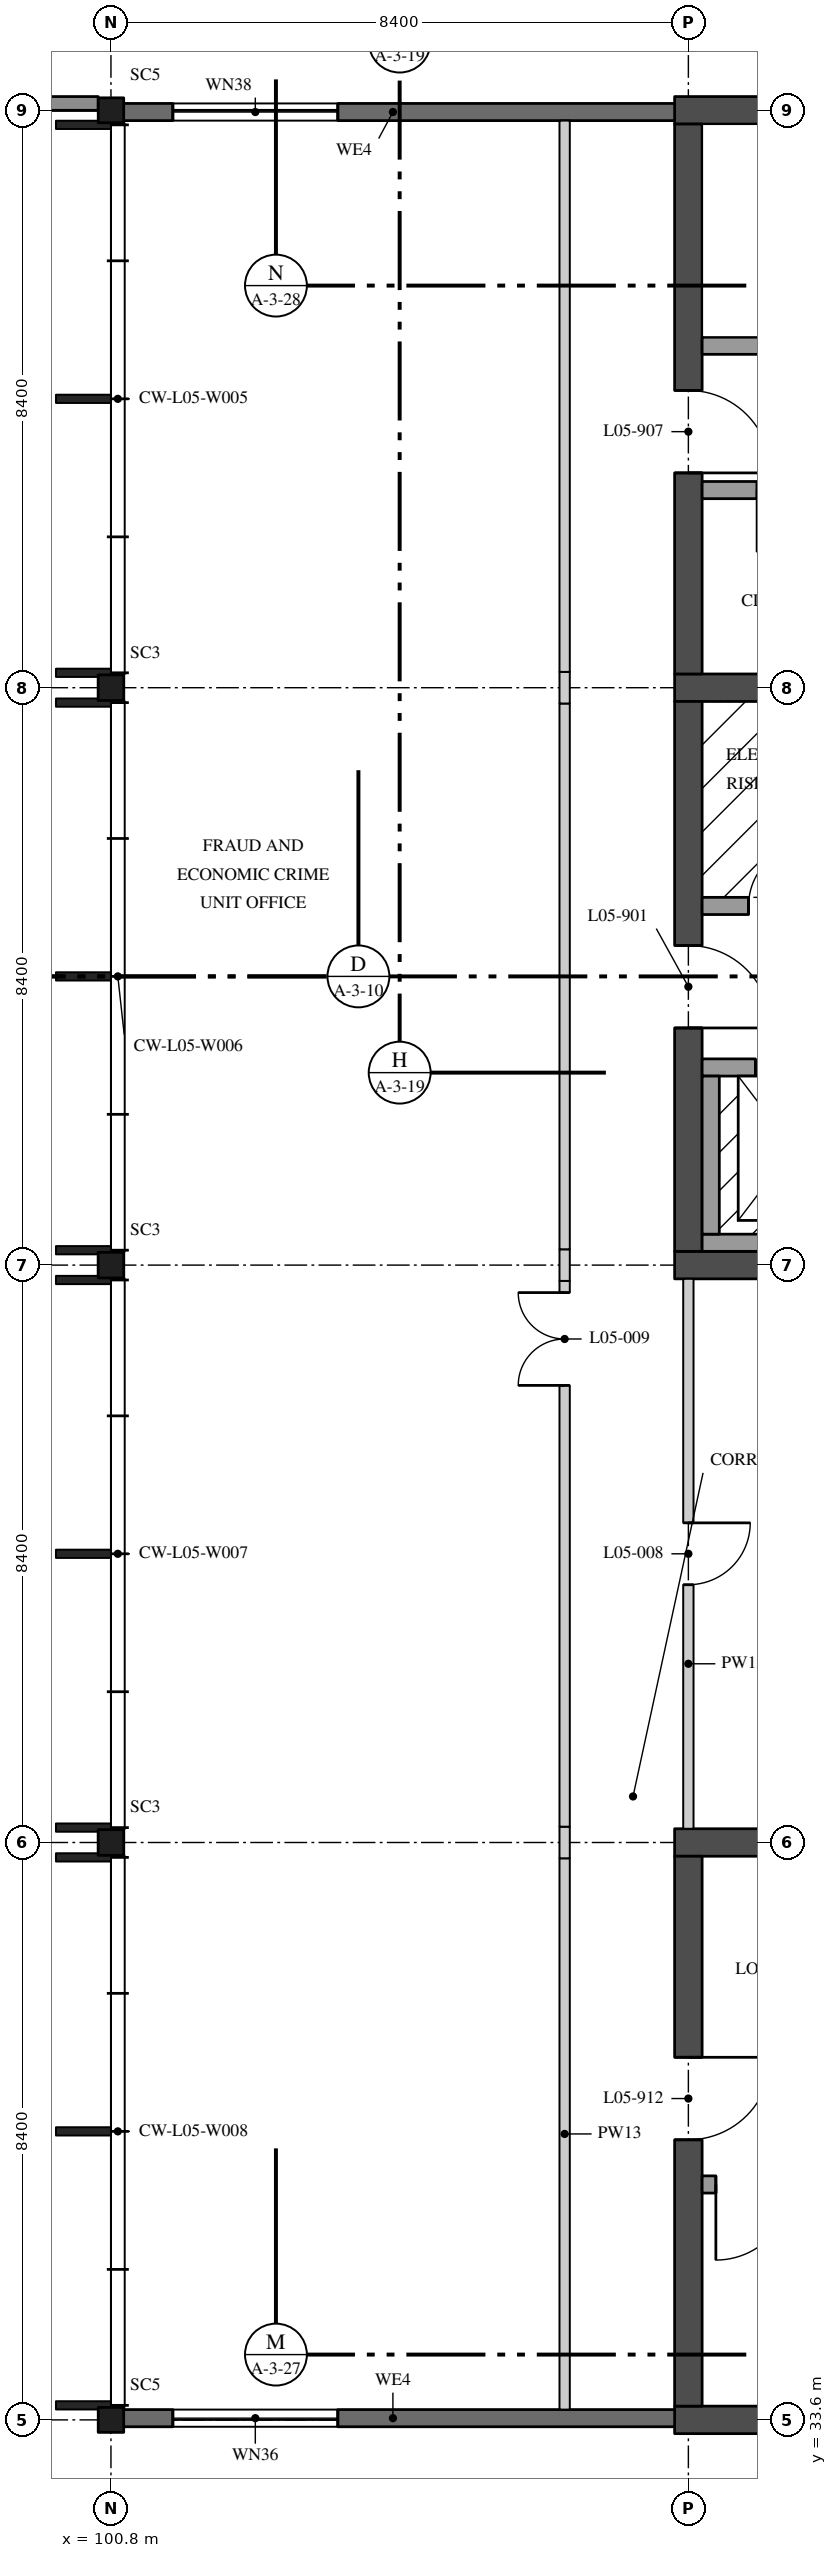
"""IFC4 building model, lengths in metres.
Left out: names, types, materials, properties, quantities, classifications, styles, units other than length and angle.
Written with IfcOpenShell. Run it as: python <this file> out.ifc"""

import sys

from ifc_helpers import new_model, si_unit, direction, frame, frame_2d, origin, origin_2d, place, context, subcontext, project, spatial, rectangle, i_section, extrude, element, fill, save


model = new_model("IFC4")
c1 = context("Model", 3, precision=1e-05, world=origin(), true_north=direction((0.0, 1.0)))
c2 = subcontext(c1, "Body", "Model", "MODEL_VIEW")
j1 = project(units=[si_unit("LENGTHUNIT", "METRE"), si_unit("PLANEANGLEUNIT", "RADIAN")], contexts=[c1])
p1 = place(None, origin())
s1 = spatial("IfcSite", under=j1, at=p1, CompositionType="ELEMENT")
p2 = place(p1, origin())
s2 = spatial("IfcBuilding", under=s1, at=p2, CompositionType="ELEMENT")
p3 = place(p2, frame((0.0, 0.0, 23.4)))
s3 = spatial("IfcBuildingStorey", under=s2, at=p3, CompositionType="ELEMENT", Elevation=23.4)
p4 = place(p3, frame((100.8, 33.6, 0.0), z_axis=(0.0, 0.0, 1.0), x_axis=(1.0, 0.0, 0.0)))
e1 = element("IfcColumn", 1, at=p4, inside=s3, PredefinedType="COLUMN", context=c2, shape_type="SweptSolid", body=[
    extrude(i_section(OverallWidth=0.371, OverallDepth=0.363, WebThickness=0.013, FlangeThickness=0.022, FilletRadius=0.015, at=origin_2d()), origin(), (0.0, 0.0, 1.0), 4.37),
])
for number, where, z_axis, x_axis in (
    (2, (100.8, 42.0, 0.0), (0.0, 0.0, 1.0), (1.0, 0.0, 0.0)),
    (3, (100.8, 50.4, 0.0), (0.0, 0.0, 1.0), (1.0, 0.0, 0.0)),
    (4, (100.8, 58.8, 0.0), (0.0, 0.0, 1.0), (1.0, 0.0, 0.0)),
):
    element("IfcColumn", number, at=place(p3, frame(where, z_axis=z_axis, x_axis=x_axis)), inside=s3, PredefinedType="COLUMN", context=c2, shape_type="SweptSolid", body=[
        extrude(i_section(OverallWidth=0.373, OverallDepth=0.373, WebThickness=0.016, FlangeThickness=0.026, FilletRadius=0.015, at=origin_2d()), origin(), (0.0, 0.0, 1.0), 4.37),
    ])
p5 = place(p3, frame((100.8, 67.2, 0.0), z_axis=(0.0, 0.0, 1.0), x_axis=(1.0, 0.0, 0.0)))
e5 = element("IfcColumn", 5, at=p5, inside=s3, PredefinedType="COLUMN", context=c2, shape_type="SweptSolid", body=[
    extrude(i_section(OverallWidth=0.371, OverallDepth=0.363, WebThickness=0.013, FlangeThickness=0.022, FilletRadius=0.015, at=origin_2d()), origin(), (0.0, 0.0, 1.0), 4.37),
])
p6 = place(p3, frame((109.0, 50.4, 0.0), z_axis=(0.0, 0.0, 1.0), x_axis=(1.0, 0.0, 0.0)))
e6 = element("IfcWall", 6, at=p6, inside=s3, PredefinedType="SHEAR", context=c2, shape_type="SweptSolid", body=[
    extrude(rectangle(XDim=8.8, YDim=0.4, at=frame_2d((4.4, 0.0))), origin(), (0.0, 0.0, 1.0), 4.37),
])
p7 = place(p3, frame((109.0, 58.8, 0.0), z_axis=(0.0, 0.0, 1.0), x_axis=(1.0, 0.0, 0.0)))
e7 = element("IfcWall", 7, at=p7, inside=s3, PredefinedType="SHEAR", context=c2, shape_type="SweptSolid", body=[
    extrude(rectangle(XDim=8.8, YDim=0.4, at=frame_2d((4.4, 0.0))), origin(), (0.0, 0.0, 1.0), 4.37),
])
p8 = place(p7, frame((6.65, 0.0, 0.0)))
e8 = element("IfcOpeningElement", 8, at=p8, cuts=e7, PredefinedType="OPENING", context=c2, shape_type="SweptSolid", body=[
    extrude(rectangle(XDim=1.1, YDim=2.1, at=frame_2d((0.55, 1.05))), frame((0.0, 0.21, 0.0), z_axis=(0.0, -1.0, 0.0), x_axis=(1.0, 0.0, 0.0)), (0.0, 0.0, 1.0), 0.42),
])
p9 = place(p3, frame((109.2, 50.6, 0.0), z_axis=(0.0, 0.0, 1.0), x_axis=(0.0, 1.0, 0.0)))
e9 = element("IfcWall", 9, at=p9, inside=s3, PredefinedType="SHEAR", context=c2, shape_type="SweptSolid", body=[
    extrude(rectangle(XDim=8.0, YDim=0.4, at=frame_2d((4.0, 0.0))), origin(), (0.0, 0.0, 1.0), 4.37),
])
p10 = place(p9, frame((3.25, 0.0, 0.0)))
e10 = element("IfcOpeningElement", 10, at=p10, cuts=e9, PredefinedType="OPENING", context=c2, shape_type="SweptSolid", body=[
    extrude(rectangle(XDim=1.2, YDim=2.1, at=frame_2d((0.6, 1.05))), frame((0.0, 0.21, 0.0), z_axis=(0.0, -1.0, 0.0), x_axis=(1.0, 0.0, 0.0)), (0.0, 0.0, 1.0), 0.42),
])
p11 = place(p3, frame((109.4, 55.625, 0.0), z_axis=(0.0, 0.0, 1.0), x_axis=(1.0, 0.0, 0.0)))
e11 = element("IfcWall", 11, at=p11, inside=s3, PredefinedType="SOLIDWALL", context=c2, shape_type="SweptSolid", body=[
    extrude(rectangle(XDim=2.25, YDim=0.25, at=frame_2d((1.125, 0.0))), origin(), (0.0, 0.0, 1.0), 4.37),
])
p12 = place(p11, frame((0.675, 0.0, 0.0)))
e12 = element("IfcOpeningElement", 12, at=p12, cuts=e11, PredefinedType="OPENING", context=c2, shape_type="SweptSolid", body=[
    extrude(rectangle(XDim=0.9, YDim=2.1, at=frame_2d((0.45, 1.05))), frame((0.0, 0.135, 0.0), z_axis=(0.0, -1.0, 0.0), x_axis=(1.0, 0.0, 0.0)), (0.0, 0.0, 1.0), 0.27),
])
p13 = place(p3, frame((109.0, 67.2, 0.0), z_axis=(0.0, 0.0, 1.0), x_axis=(1.0, 0.0, 0.0)))
e13 = element("IfcWall", 13, at=p13, inside=s3, PredefinedType="SHEAR", context=c2, shape_type="SweptSolid", body=[
    extrude(rectangle(XDim=8.8, YDim=0.4, at=frame_2d((4.4, 0.0))), origin(), (0.0, 0.0, 1.0), 4.37),
])
p14 = place(p3, frame((109.2, 59.0, 0.0), z_axis=(0.0, 0.0, 1.0), x_axis=(0.0, 1.0, 0.0)))
e14 = element("IfcWall", 14, at=p14, inside=s3, PredefinedType="SHEAR", context=c2, shape_type="SweptSolid", body=[
    extrude(rectangle(XDim=8.0, YDim=0.4, at=frame_2d((4.0, 0.0))), origin(), (0.0, 0.0, 1.0), 4.37),
])
p15 = place(p14, frame((2.925, 0.0, 0.0)))
e15 = element("IfcOpeningElement", 15, at=p15, cuts=e14, PredefinedType="OPENING", context=c2, shape_type="SweptSolid", body=[
    extrude(rectangle(XDim=1.2, YDim=2.1, at=frame_2d((0.6, 1.05))), frame((0.0, 0.21, 0.0), z_axis=(0.0, -1.0, 0.0), x_axis=(1.0, 0.0, 0.0)), (0.0, 0.0, 1.0), 0.42),
])
p16 = place(p3, frame((117.4, 63.775, 0.0), z_axis=(0.0, 0.0, 1.0), x_axis=(-1.0, 0.0, 0.0)))
e16 = element("IfcWall", 16, at=p16, inside=s3, PredefinedType="SOLIDWALL", context=c2, shape_type="SweptSolid", body=[
    extrude(rectangle(XDim=8.0, YDim=0.25, at=frame_2d((4.0, 0.0))), origin(), (0.0, 0.0, 1.0), 4.37),
])
p17 = place(p16, frame((0.2, 0.0, 0.0)))
e17 = element("IfcOpeningElement", 17, at=p17, cuts=e16, PredefinedType="OPENING", context=c2, shape_type="SweptSolid", body=[
    extrude(rectangle(XDim=1.1, YDim=2.1, at=frame_2d((0.55, 1.05))), frame((0.0, 0.135, 0.0), z_axis=(0.0, -1.0, 0.0), x_axis=(1.0, 0.0, 0.0)), (0.0, 0.0, 1.0), 0.27),
])
p18 = place(p3, frame((114.75, 61.675, 0.0), z_axis=(0.0, 0.0, 1.0), x_axis=(-1.0, 0.0, 0.0)))
e18 = element("IfcWall", 18, at=p18, inside=s3, PredefinedType="SOLIDWALL", context=c2, shape_type="SweptSolid", body=[
    extrude(rectangle(XDim=5.35, YDim=0.25, at=frame_2d((2.675, 0.0))), origin(), (0.0, 0.0, 1.0), 4.37),
])
p19 = place(p18, frame((3.65, 0.0, 0.0)))
e19 = element("IfcOpeningElement", 19, at=p19, cuts=e18, PredefinedType="OPENING", context=c2, shape_type="SweptSolid", body=[
    extrude(rectangle(XDim=0.9, YDim=2.1, at=frame_2d((0.45, 1.05))), frame((0.0, 0.135, 0.0), z_axis=(0.0, -1.0, 0.0), x_axis=(1.0, 0.0, 0.0)), (0.0, 0.0, 1.0), 0.27),
])
p20 = place(p18, frame((0.9, 0.0, 0.0)))
e20 = element("IfcOpeningElement", 20, at=p20, cuts=e18, PredefinedType="OPENING", context=c2, shape_type="SweptSolid", body=[
    extrude(rectangle(XDim=0.8, YDim=2.1, at=frame_2d((0.4, 1.05))), frame((0.0, 0.135, 0.0), z_axis=(0.0, -1.0, 0.0), x_axis=(1.0, 0.0, 0.0)), (0.0, 0.0, 1.0), 0.27),
])
for number, where, z_axis, x_axis in (
    (21, (109.0, 33.6, 0.0), (0.0, 0.0, 1.0), (1.0, 0.0, 0.0)),
    (22, (109.0, 42.0, 0.0), (0.0, 0.0, 1.0), (1.0, 0.0, 0.0)),
):
    element("IfcWall", number, at=place(p3, frame(where, z_axis=z_axis, x_axis=x_axis)), inside=s3, PredefinedType="SHEAR", context=c2, shape_type="SweptSolid", body=[
        extrude(rectangle(XDim=8.8, YDim=0.4, at=frame_2d((4.4, 0.0))), origin(), (0.0, 0.0, 1.0), 4.37),
    ])
p21 = place(p3, frame((109.2, 33.8, 0.0), z_axis=(0.0, 0.0, 1.0), x_axis=(0.0, 1.0, 0.0)))
e23 = element("IfcWall", 23, at=p21, inside=s3, PredefinedType="SHEAR", context=c2, shape_type="SweptSolid", body=[
    extrude(rectangle(XDim=8.0, YDim=0.4, at=frame_2d((4.0, 0.0))), origin(), (0.0, 0.0, 1.0), 4.37),
])
p22 = place(p21, frame((3.875, 0.0, 0.0)))
e24 = element("IfcOpeningElement", 24, at=p22, cuts=e23, PredefinedType="OPENING", context=c2, shape_type="SweptSolid", body=[
    extrude(rectangle(XDim=1.2, YDim=2.1, at=frame_2d((0.6, 1.05))), frame((0.0, 0.21, 0.0), z_axis=(0.0, -1.0, 0.0), x_axis=(1.0, 0.0, 0.0)), (0.0, 0.0, 1.0), 0.42),
])
p23 = place(p3, frame((109.4, 37.025, 0.0), z_axis=(0.0, 0.0, 1.0), x_axis=(1.0, 0.0, 0.0)))
e25 = element("IfcWall", 25, at=p23, inside=s3, PredefinedType="SOLIDWALL", context=c2, shape_type="SweptSolid", body=[
    extrude(rectangle(XDim=8.0, YDim=0.25, at=frame_2d((4.0, 0.0))), origin(), (0.0, 0.0, 1.0), 4.37),
])
p24 = place(p23, frame((0.2, 0.0, 0.0)))
e26 = element("IfcOpeningElement", 26, at=p24, cuts=e25, PredefinedType="OPENING", context=c2, shape_type="SweptSolid", body=[
    extrude(rectangle(XDim=1.1, YDim=2.1, at=frame_2d((0.55, 1.05))), frame((0.0, 0.135, 0.0), z_axis=(0.0, -1.0, 0.0), x_axis=(1.0, 0.0, 0.0)), (0.0, 0.0, 1.0), 0.27),
])
p25 = place(p3, frame((109.4, 53.275, 0.0), z_axis=(0.0, 0.0, 1.0), x_axis=(1.0, 0.0, 0.0)))
e27 = element("IfcWall", 27, at=p25, inside=s3, PredefinedType="SOLIDWALL", context=c2, shape_type="SweptSolid", body=[
    extrude(rectangle(XDim=2.65, YDim=0.25, at=frame_2d((1.325, 0.0))), origin(), (0.0, 0.0, 1.0), 4.37),
])
p26 = place(p25, frame((0.775, 0.0, 0.0)))
e28 = element("IfcOpeningElement", 28, at=p26, cuts=e27, PredefinedType="OPENING", context=c2, shape_type="SweptSolid", body=[
    extrude(rectangle(XDim=1.1, YDim=2.1, at=frame_2d((0.55, 1.05))), frame((0.0, 0.135, 0.0), z_axis=(0.0, -1.0, 0.0), x_axis=(1.0, 0.0, 0.0)), (0.0, 0.0, 1.0), 0.27),
])
p27 = place(p3, frame((109.4, 50.725, 0.0), z_axis=(0.0, 0.0, 1.0), x_axis=(1.0, 0.0, 0.0)))
e29 = element("IfcWall", 29, at=p27, inside=s3, PredefinedType="SOLIDWALL", context=c2, shape_type="SweptSolid", body=[
    extrude(rectangle(XDim=2.65, YDim=0.25, at=frame_2d((1.325, 0.0))), origin(), (0.0, 0.0, 1.0), 4.37),
])
p28 = place(p3, frame((109.525, 50.85, 0.0), z_axis=(0.0, 0.0, 1.0), x_axis=(0.0, 1.0, 0.0)))
e30 = element("IfcWall", 30, at=p28, inside=s3, PredefinedType="SOLIDWALL", context=c2, shape_type="SweptSolid", body=[
    extrude(rectangle(XDim=2.3, YDim=0.25, at=frame_2d((1.15, 0.0))), origin(), (0.0, 0.0, 1.0), 4.37),
])
p29 = place(p3, frame((109.2, 42.2, 0.0), z_axis=(0.0, 0.0, 1.0), x_axis=(0.0, 1.0, 0.0)))
e31 = element("IfcWall", 31, at=p29, inside=s3, PredefinedType="PARTITIONING", context=c2, shape_type="SweptSolid", body=[
    extrude(rectangle(XDim=8.0, YDim=0.15, at=frame_2d((4.0, 0.0))), origin(), (0.0, 0.0, 1.0), 3.746),
])
p30 = place(p29, frame((3.55, 0.0, 0.0)))
e32 = element("IfcOpeningElement", 32, at=p30, cuts=e31, PredefinedType="OPENING", context=c2, shape_type="SweptSolid", body=[
    extrude(rectangle(XDim=0.9, YDim=2.1, at=frame_2d((0.45, 1.05))), frame((0.0, 0.085, 0.0), z_axis=(0.0, -1.0, 0.0), x_axis=(1.0, 0.0, 0.0)), (0.0, 0.0, 1.0), 0.17),
])
p31 = place(p3, frame((107.4, 33.75, 0.0), z_axis=(0.0, 0.0, 1.0), x_axis=(0.0, 1.0, 0.0)))
e33 = element("IfcWall", 33, at=p31, inside=s3, PredefinedType="PARTITIONING", context=c2, shape_type="SweptSolid", body=[
    extrude(rectangle(XDim=8.02, YDim=0.15, at=frame_2d((4.01, 0.0))), origin(), (0.0, 0.0, 1.0), 4.37),
])
p32 = place(p3, frame((107.4, 41.77, 0.0), z_axis=(0.0, 0.0, 1.0), x_axis=(0.0, 1.0, 0.0)))
e34 = element("IfcWall", 34, at=p32, inside=s3, PredefinedType="PARTITIONING", context=c2, shape_type="SweptSolid", body=[
    extrude(rectangle(XDim=0.46, YDim=0.15, at=frame_2d((0.23, 0.0))), origin(), (0.0, 0.0, 1.0), 3.746),
])
p33 = place(p3, frame((107.4, 42.23, 0.0), z_axis=(0.0, 0.0, 1.0), x_axis=(0.0, 1.0, 0.0)))
e35 = element("IfcWall", 35, at=p33, inside=s3, PredefinedType="PARTITIONING", context=c2, shape_type="SweptSolid", body=[
    extrude(rectangle(XDim=7.94, YDim=0.15, at=frame_2d((3.97, 0.0))), origin(), (0.0, 0.0, 1.0), 4.37),
])
p34 = place(p33, frame((6.42, 0.0, 0.0)))
e36 = element("IfcOpeningElement", 36, at=p34, cuts=e35, PredefinedType="OPENING", context=c2, shape_type="SweptSolid", body=[
    extrude(rectangle(XDim=1.35, YDim=2.1, at=frame_2d((0.675, 1.05))), frame((0.0, 0.085, 0.0), z_axis=(0.0, -1.0, 0.0), x_axis=(1.0, 0.0, 0.0)), (0.0, 0.0, 1.0), 0.17),
])
p35 = place(p3, frame((107.4, 50.17, 0.0), z_axis=(0.0, 0.0, 1.0), x_axis=(0.0, 1.0, 0.0)))
e37 = element("IfcWall", 37, at=p35, inside=s3, PredefinedType="PARTITIONING", context=c2, shape_type="SweptSolid", body=[
    extrude(rectangle(XDim=0.46, YDim=0.15, at=frame_2d((0.23, 0.0))), origin(), (0.0, 0.0, 1.0), 3.746),
])
p36 = place(p3, frame((107.4, 50.63, 0.0), z_axis=(0.0, 0.0, 1.0), x_axis=(0.0, 1.0, 0.0)))
e38 = element("IfcWall", 38, at=p36, inside=s3, PredefinedType="PARTITIONING", context=c2, shape_type="SweptSolid", body=[
    extrude(rectangle(XDim=7.94, YDim=0.15, at=frame_2d((3.97, 0.0))), origin(), (0.0, 0.0, 1.0), 4.37),
])
p37 = place(p3, frame((107.4, 58.57, 0.0), z_axis=(0.0, 0.0, 1.0), x_axis=(0.0, 1.0, 0.0)))
e39 = element("IfcWall", 39, at=p37, inside=s3, PredefinedType="PARTITIONING", context=c2, shape_type="SweptSolid", body=[
    extrude(rectangle(XDim=0.46, YDim=0.15, at=frame_2d((0.23, 0.0))), origin(), (0.0, 0.0, 1.0), 3.746),
])
p38 = place(p3, frame((107.4, 59.03, 0.0), z_axis=(0.0, 0.0, 1.0), x_axis=(0.0, 1.0, 0.0)))
e40 = element("IfcWall", 40, at=p38, inside=s3, PredefinedType="PARTITIONING", context=c2, shape_type="SweptSolid", body=[
    extrude(rectangle(XDim=8.02, YDim=0.15, at=frame_2d((4.01, 0.0))), origin(), (0.0, 0.0, 1.0), 4.37),
])
p39 = place(p3, frame((100.803, 33.625, 0.0), z_axis=(0.0, 0.0, 1.0), x_axis=(1.0, 0.0, 0.0)))
e41 = element("IfcWall", 41, at=p39, inside=s3, PredefinedType="SOLIDWALL", context=c2, shape_type="SweptSolid", body=[
    extrude(rectangle(XDim=8.197, YDim=0.25, at=frame_2d((4.098, 0.0))), origin(), (0.0, 0.0, 1.0), 3.746),
])
p40 = place(p39, frame((0.896, 0.0, 0.9)))
e42 = element("IfcOpeningElement", 42, at=p40, cuts=e41, PredefinedType="OPENING", context=c2, shape_type="SweptSolid", body=[
    extrude(rectangle(XDim=2.4, YDim=1.95, at=frame_2d((1.2, 0.975))), frame((0.0, 0.135, 0.0), z_axis=(0.0, -1.0, 0.0), x_axis=(1.0, 0.0, 0.0)), (0.0, 0.0, 1.0), 0.27),
])
p41 = place(p3, frame((109.0, 67.175, 0.0), z_axis=(0.0, 0.0, 1.0), x_axis=(-1.0, 0.0, 0.0)))
e43 = element("IfcWall", 43, at=p41, inside=s3, PredefinedType="SOLIDWALL", context=c2, shape_type="SweptSolid", body=[
    extrude(rectangle(XDim=8.197, YDim=0.25, at=frame_2d((4.098, 0.0))), origin(), (0.0, 0.0, 1.0), 3.746),
])
p42 = place(p41, frame((4.9, 0.0, 0.9)))
e44 = element("IfcOpeningElement", 44, at=p42, cuts=e43, PredefinedType="OPENING", context=c2, shape_type="SweptSolid", body=[
    extrude(rectangle(XDim=2.4, YDim=2.25, at=frame_2d((1.2, 1.125))), frame((0.0, 0.135, 0.0), z_axis=(0.0, -1.0, 0.0), x_axis=(1.0, 0.0, 0.0)), (0.0, 0.0, 1.0), 0.27),
])
p43 = place(p3, frame((92.6, 67.3, 0.0), z_axis=(0.0, 0.0, 1.0), x_axis=(1.0, 0.0, 0.0)))
e45 = element("IfcWall", 45, at=p43, inside=s3, PredefinedType="PARAPET", context=c2, shape_type="SweptSolid", body=[
    extrude(rectangle(XDim=8.014, YDim=0.2, at=frame_2d((4.007, 0.0))), origin(), (0.0, 0.0, 1.0), 1.1),
])
p44 = place(p10, frame((1.2, 0.0, 0.0), z_axis=(0.0, 0.0, 1.0), x_axis=(-1.0, 0.0, 0.0)))
e46 = element("IfcDoor", 46, at=p44, inside=s3, OperationType="SINGLE_SWING_LEFT", PredefinedType="DOOR", context=c2, shape_type="SweptSolid", body=[
    extrude(rectangle(XDim=1.2, YDim=2.1, at=frame_2d((0.6, 1.05))), frame((0.0, 0.035, 0.0), z_axis=(0.0, -1.0, 0.0), x_axis=(1.0, 0.0, 0.0)), (0.0, 0.0, 1.0), 0.07),
])
fill(e10, e46)
p45 = place(p12, origin())
e47 = element("IfcDoor", 47, at=p45, inside=s3, OperationType="SINGLE_SWING_LEFT", PredefinedType="DOOR", context=c2, shape_type="SweptSolid", body=[
    extrude(rectangle(XDim=0.9, YDim=2.1, at=frame_2d((0.45, 1.05))), frame((0.0, 0.05, 0.0), z_axis=(0.0, -1.0, 0.0), x_axis=(1.0, 0.0, 0.0)), (0.0, 0.0, 1.0), 0.1),
])
fill(e12, e47)
p46 = place(p15, frame((1.2, 0.0, 0.0), z_axis=(0.0, 0.0, 1.0), x_axis=(-1.0, 0.0, 0.0)))
e48 = element("IfcDoor", 48, at=p46, inside=s3, OperationType="SINGLE_SWING_LEFT", PredefinedType="DOOR", context=c2, shape_type="SweptSolid", body=[
    extrude(rectangle(XDim=1.2, YDim=2.1, at=frame_2d((0.6, 1.05))), frame((0.0, 0.035, 0.0), z_axis=(0.0, -1.0, 0.0), x_axis=(1.0, 0.0, 0.0)), (0.0, 0.0, 1.0), 0.07),
])
fill(e15, e48)
p47 = place(p22, frame((1.2, 0.0, 0.0), z_axis=(0.0, 0.0, 1.0), x_axis=(-1.0, 0.0, 0.0)))
e49 = element("IfcDoor", 49, at=p47, inside=s3, OperationType="SINGLE_SWING_RIGHT", PredefinedType="DOOR", context=c2, shape_type="SweptSolid", body=[
    extrude(rectangle(XDim=1.2, YDim=2.1, at=frame_2d((0.6, 1.05))), frame((0.0, 0.035, 0.0), z_axis=(0.0, -1.0, 0.0), x_axis=(1.0, 0.0, 0.0)), (0.0, 0.0, 1.0), 0.07),
])
fill(e24, e49)
p48 = place(p24, frame((1.1, 0.0, 0.0), z_axis=(0.0, 0.0, 1.0), x_axis=(-1.0, 0.0, 0.0)))
e50 = element("IfcDoor", 50, at=p48, inside=s3, OperationType="SINGLE_SWING_LEFT", PredefinedType="DOOR", context=c2, shape_type="SweptSolid", body=[
    extrude(rectangle(XDim=1.1, YDim=2.1, at=frame_2d((0.55, 1.05))), frame((0.0, 0.035, 0.0), z_axis=(0.0, -1.0, 0.0), x_axis=(1.0, 0.0, 0.0)), (0.0, 0.0, 1.0), 0.07),
])
fill(e26, e50)
p49 = place(p26, origin())
e51 = element("IfcDoor", 51, at=p49, inside=s3, OperationType="DOUBLE_DOOR_SLIDING", PredefinedType="DOOR", context=c2, shape_type="SweptSolid", body=[
    extrude(rectangle(XDim=1.1, YDim=2.1, at=frame_2d((0.55, 1.05))), frame((0.0, 0.04, 0.0), z_axis=(0.0, -1.0, 0.0), x_axis=(1.0, 0.0, 0.0)), (0.0, 0.0, 1.0), 0.08),
])
fill(e28, e51)
p50 = place(p30, frame((0.9, 0.0, 0.0), z_axis=(0.0, 0.0, 1.0), x_axis=(-1.0, 0.0, 0.0)))
e52 = element("IfcDoor", 52, at=p50, inside=s3, OperationType="SINGLE_SWING_RIGHT", PredefinedType="DOOR", context=c2, shape_type="SweptSolid", body=[
    extrude(rectangle(XDim=0.9, YDim=2.1, at=frame_2d((0.45, 1.05))), frame((0.0, 0.025, 0.0), z_axis=(0.0, -1.0, 0.0), x_axis=(1.0, 0.0, 0.0)), (0.0, 0.0, 1.0), 0.05),
])
fill(e32, e52)
p51 = place(p34, origin())
e53 = element("IfcDoor", 53, at=p51, inside=s3, OperationType="DOUBLE_DOOR_SINGLE_SWING", PredefinedType="DOOR", context=c2, shape_type="SweptSolid", body=[
    extrude(rectangle(XDim=1.35, YDim=2.1, at=frame_2d((0.675, 1.05))), frame((0.0, 0.025, 0.0), z_axis=(0.0, -1.0, 0.0), x_axis=(1.0, 0.0, 0.0)), (0.0, 0.0, 1.0), 0.05),
])
fill(e36, e53)
p52 = place(p40, origin())
e54 = element("IfcWindow", 54, at=p52, inside=s3, PartitioningType="SINGLE_PANEL", PredefinedType="WINDOW", context=c2, shape_type="SweptSolid", body=[
    extrude(rectangle(XDim=2.4, YDim=1.95, at=frame_2d((1.2, 0.975))), frame((0.0, 0.04, 0.0), z_axis=(0.0, -1.0, 0.0), x_axis=(1.0, 0.0, 0.0)), (0.0, 0.0, 1.0), 0.08),
])
fill(e42, e54)
p53 = place(p42, origin())
e55 = element("IfcWindow", 55, at=p53, inside=s3, PartitioningType="SINGLE_PANEL", PredefinedType="WINDOW", context=c2, shape_type="SweptSolid", body=[
    extrude(rectangle(XDim=2.4, YDim=2.25, at=frame_2d((1.2, 1.125))), frame((0.0, 0.03, 0.0), z_axis=(0.0, -1.0, 0.0), x_axis=(1.0, 0.0, 0.0)), (0.0, 0.0, 1.0), 0.06),
])
fill(e44, e55)
save(model, sys.argv[1])
